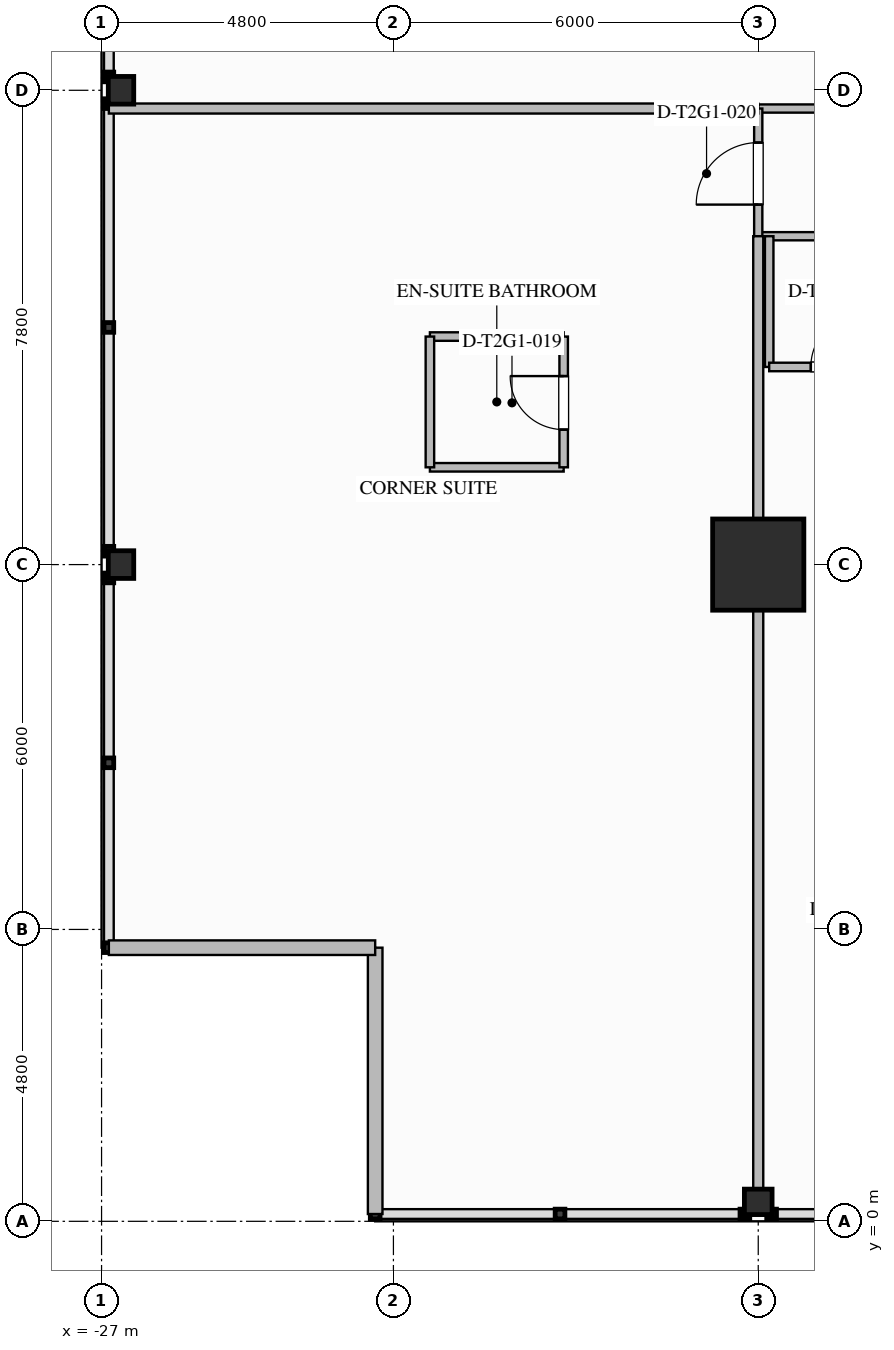
"""IFC4 building model, lengths in metres.
Left out: names, types, materials, properties, quantities, classifications, styles, units other than length and angle.
Written with IfcOpenShell. Run it as: python <this file> out.ifc"""

import sys

from ifc_helpers import new_model, si_unit, direction, frame, frame_2d, origin, origin_2d, place, context, subcontext, project, spatial, rectangle, i_section, extrude, element, fill, save


model = new_model("IFC4")
c1 = context("Model", 3, precision=1e-05, world=origin(), true_north=direction((0.0, 1.0)))
c2 = subcontext(c1, "Body", "Model", "MODEL_VIEW")
j1 = project(units=[si_unit("LENGTHUNIT", "METRE"), si_unit("PLANEANGLEUNIT", "RADIAN")], contexts=[c1])
p1 = place(None, origin())
s1 = spatial("IfcSite", under=j1, at=p1, CompositionType="ELEMENT")
p2 = place(p1, origin())
s2 = spatial("IfcBuilding", under=s1, at=p2, CompositionType="ELEMENT")
p3 = place(p2, frame((0.0, 0.0, 91.8)))
s3 = spatial("IfcBuildingStorey", under=s2, at=p3, CompositionType="ELEMENT", Elevation=91.8)
p4 = place(p3, frame((-16.2, 10.8, 0.0), z_axis=(0.0, 0.0, 1.0), x_axis=(1.0, 0.0, 0.0)))
e1 = element("IfcColumn", 1, at=p4, inside=s3, PredefinedType="COLUMN", context=c2, shape_type="SweptSolid", body=[
    extrude(rectangle(XDim=1.5, YDim=1.5, at=origin_2d()), origin(), (0.0, 0.0, 1.0), 3.5),
])
for number, where, z_axis, x_axis in (
    (2, (-26.68, 10.8, 0.0), (0.0, 0.0, 1.0), (1.0, 0.0, 0.0)),
    (3, (-26.68, 18.6, 0.0), (0.0, 0.0, 1.0), (1.0, 0.0, 0.0)),
    (4, (-16.2, 0.32, 0.0), (0.0, 0.0, 1.0), (0.0, 1.0, 0.0)),
):
    element("IfcColumn", number, at=place(p3, frame(where, z_axis=z_axis, x_axis=x_axis)), inside=s3, PredefinedType="COLUMN", context=c2, shape_type="SweptSolid", body=[
        extrude(i_section(OverallWidth=0.418, OverallDepth=0.455, WebThickness=0.042, FlangeThickness=0.068, FilletRadius=0.03, at=origin_2d()), origin(), (0.0, 0.0, 1.0), 3.497),
    ])
for number, where, z_axis, x_axis in (
    (5, (-22.5, 0.12, 0.0), (0.0, 0.0, 1.0), (0.0, 1.0, 0.0)),
    (6, (-22.5, 4.5, 0.0), (0.0, 0.0, 1.0), (-1.0, 0.0, 0.0)),
):
    element("IfcWall", number, at=place(p3, frame(where, z_axis=z_axis, x_axis=x_axis)), inside=s3, PredefinedType="STANDARD", context=c2, shape_type="SweptSolid", body=[
        extrude(rectangle(XDim=4.38, YDim=0.24, at=frame_2d((2.19, 0.0))), origin(), (0.0, 0.0, 1.0), 3.24),
    ])
p5 = place(p3, frame((-16.2, 18.3, 0.0), z_axis=(0.0, 0.0, 1.0), x_axis=(1.0, 0.0, 0.0)))
e7 = element("IfcWall", 7, at=p5, inside=s3, PredefinedType="PARTITIONING", context=c2, shape_type="SweptSolid", body=[
    extrude(rectangle(XDim=5.4, YDim=0.135, at=frame_2d((2.7, 0.0))), origin(), (0.0, 0.0, 1.0), 3.24),
])
p6 = place(p3, frame((-16.2, 16.2, 0.0), z_axis=(0.0, 0.0, 1.0), x_axis=(1.0, 0.0, 0.0)))
e8 = element("IfcWall", 8, at=p6, inside=s3, PredefinedType="PARTITIONING", context=c2, shape_type="SweptSolid", body=[
    extrude(rectangle(XDim=24.9, YDim=0.135, at=frame_2d((12.45, 0.0))), origin(), (0.0, 0.0, 1.0), 3.24),
])
p7 = place(p6, frame((3.271, 0.0, 0.0)))
e9 = element("IfcOpeningElement", 9, at=p7, cuts=e8, PredefinedType="OPENING", context=c2, shape_type="SweptSolid", body=[
    extrude(rectangle(XDim=0.96, YDim=2.15, at=frame_2d((0.48, 1.075))), frame((0.0, 0.077, 0.0), z_axis=(0.0, -1.0, 0.0), x_axis=(1.0, 0.0, 0.0)), (0.0, 0.0, 1.0), 0.155),
])
p8 = place(p6, frame((8.113, 0.0, 0.0)))
e10 = element("IfcOpeningElement", 10, at=p8, cuts=e8, PredefinedType="OPENING", context=c2, shape_type="SweptSolid", body=[
    extrude(rectangle(XDim=0.96, YDim=2.15, at=frame_2d((0.48, 1.075))), frame((0.0, 0.077, 0.0), z_axis=(0.0, -1.0, 0.0), x_axis=(1.0, 0.0, 0.0)), (0.0, 0.0, 1.0), 0.155),
])
p9 = place(p6, frame((13.035, 0.0, 0.0)))
e11 = element("IfcOpeningElement", 11, at=p9, cuts=e8, PredefinedType="OPENING", context=c2, shape_type="SweptSolid", body=[
    extrude(rectangle(XDim=1.26, YDim=2.2, at=frame_2d((0.63, 1.1))), frame((0.0, 0.077, 0.0), z_axis=(0.0, -1.0, 0.0), x_axis=(1.0, 0.0, 0.0)), (0.0, 0.0, 1.0), 0.155),
])
p10 = place(p6, frame((18.488, 0.0, 0.0)))
e12 = element("IfcOpeningElement", 12, at=p10, cuts=e8, PredefinedType="OPENING", context=c2, shape_type="SweptSolid", body=[
    extrude(rectangle(XDim=0.96, YDim=2.15, at=frame_2d((0.48, 1.075))), frame((0.0, 0.077, 0.0), z_axis=(0.0, -1.0, 0.0), x_axis=(1.0, 0.0, 0.0)), (0.0, 0.0, 1.0), 0.155),
])
p11 = place(p6, frame((23.329, 0.0, 0.0)))
e13 = element("IfcOpeningElement", 13, at=p11, cuts=e8, PredefinedType="OPENING", context=c2, shape_type="SweptSolid", body=[
    extrude(rectangle(XDim=0.96, YDim=2.15, at=frame_2d((0.48, 1.075))), frame((0.0, 0.077, 0.0), z_axis=(0.0, -1.0, 0.0), x_axis=(1.0, 0.0, 0.0)), (0.0, 0.0, 1.0), 0.155),
])
p12 = place(p3, frame((-16.2, 16.2, 0.0), z_axis=(0.0, 0.0, 1.0), x_axis=(0.0, 1.0, 0.0)))
e14 = element("IfcWall", 14, at=p12, inside=s3, PredefinedType="PARTITIONING", context=c2, shape_type="SweptSolid", body=[
    extrude(rectangle(XDim=2.1, YDim=0.135, at=frame_2d((1.05, 0.0))), origin(), (0.0, 0.0, 1.0), 2.452),
])
p13 = place(p12, frame((0.52, 0.0, 0.0)))
e15 = element("IfcOpeningElement", 15, at=p13, cuts=e14, PredefinedType="OPENING", context=c2, shape_type="SweptSolid", body=[
    extrude(rectangle(XDim=1.02, YDim=2.15, at=frame_2d((0.51, 1.075))), frame((0.0, 0.077, 0.0), z_axis=(0.0, -1.0, 0.0), x_axis=(1.0, 0.0, 0.0)), (0.0, 0.0, 1.0), 0.155),
])
p14 = place(p3, frame((-16.2, 0.12, 0.0), z_axis=(0.0, 0.0, 1.0), x_axis=(0.0, 1.0, 0.0)))
e16 = element("IfcWall", 16, at=p14, inside=s3, PredefinedType="PARTITIONING", context=c2, shape_type="SweptSolid", body=[
    extrude(rectangle(XDim=16.08, YDim=0.165, at=frame_2d((8.04, 0.0))), origin(), (0.0, 0.0, 1.0), 2.452),
])
p15 = place(p3, frame((-26.88, 18.3, 0.0), z_axis=(0.0, 0.0, 1.0), x_axis=(1.0, 0.0, 0.0)))
e17 = element("IfcWall", 17, at=p15, inside=s3, PredefinedType="PARTITIONING", context=c2, shape_type="SweptSolid", body=[
    extrude(rectangle(XDim=10.68, YDim=0.165, at=frame_2d((5.34, 0.0))), origin(), (0.0, 0.0, 1.0), 2.452),
])
for number, where, z_axis, x_axis in (
    (18, (-21.6, 12.4, 0.0), (0.0, 0.0, 1.0), (1.0, 0.0, 0.0)),
    (19, (-21.6, 14.55, 0.0), (0.0, 0.0, 1.0), (1.0, 0.0, 0.0)),
):
    element("IfcWall", number, at=place(p3, frame(where, z_axis=z_axis, x_axis=x_axis)), inside=s3, PredefinedType="PLUMBINGWALL", context=c2, shape_type="SweptSolid", body=[
        extrude(rectangle(XDim=2.2, YDim=0.14, at=frame_2d((1.1, 0.0))), origin(), (0.0, 0.0, 1.0), 3.24),
    ])
p16 = place(p3, frame((-21.6, 12.4, 0.0), z_axis=(0.0, 0.0, 1.0), x_axis=(0.0, 1.0, 0.0)))
e20 = element("IfcWall", 20, at=p16, inside=s3, PredefinedType="PLUMBINGWALL", context=c2, shape_type="SweptSolid", body=[
    extrude(rectangle(XDim=2.15, YDim=0.14, at=frame_2d((1.075, 0.0))), origin(), (0.0, 0.0, 1.0), 3.24),
])
p17 = place(p3, frame((-19.4, 12.4, 0.0), z_axis=(0.0, 0.0, 1.0), x_axis=(0.0, 1.0, 0.0)))
e21 = element("IfcWall", 21, at=p17, inside=s3, PredefinedType="PLUMBINGWALL", context=c2, shape_type="SweptSolid", body=[
    extrude(rectangle(XDim=2.15, YDim=0.14, at=frame_2d((1.075, 0.0))), origin(), (0.0, 0.0, 1.0), 3.24),
])
p18 = place(p17, frame((0.62, 0.0, 0.0)))
e22 = element("IfcOpeningElement", 22, at=p18, cuts=e21, PredefinedType="OPENING", context=c2, shape_type="SweptSolid", body=[
    extrude(rectangle(XDim=0.88, YDim=2.1, at=frame_2d((0.44, 1.05))), frame((0.0, 0.08, 0.0), z_axis=(0.0, -1.0, 0.0), x_axis=(1.0, 0.0, 0.0)), (0.0, 0.0, 1.0), 0.16),
])
p19 = place(p3, frame((-16.02, 16.2, 0.0), z_axis=(0.0, 0.0, 1.0), x_axis=(0.0, -1.0, 0.0)))
e23 = element("IfcWall", 23, at=p19, inside=s3, PredefinedType="PLUMBINGWALL", context=c2, shape_type="SweptSolid", body=[
    extrude(rectangle(XDim=2.15, YDim=0.14, at=frame_2d((1.075, 0.0))), origin(), (0.0, 0.0, 1.0), 2.452),
])
p20 = place(p3, frame((-16.02, 14.05, 0.0), z_axis=(0.0, 0.0, 1.0), x_axis=(1.0, 0.0, 0.0)))
e24 = element("IfcWall", 24, at=p20, inside=s3, PredefinedType="PLUMBINGWALL", context=c2, shape_type="SweptSolid", body=[
    extrude(rectangle(XDim=2.25, YDim=0.14, at=frame_2d((1.125, 0.0))), origin(), (0.0, 0.0, 1.0), 3.24),
])
p21 = place(p20, frame((0.685, 0.0, 0.0)))
e25 = element("IfcOpeningElement", 25, at=p21, cuts=e24, PredefinedType="OPENING", context=c2, shape_type="SweptSolid", body=[
    extrude(rectangle(XDim=0.88, YDim=2.1, at=frame_2d((0.44, 1.05))), frame((0.0, 0.08, 0.0), z_axis=(0.0, -1.0, 0.0), x_axis=(1.0, 0.0, 0.0)), (0.0, 0.0, 1.0), 0.16),
])
p22 = place(p18, origin())
e26 = element("IfcDoor", 26, at=p22, inside=s3, OperationType="SINGLE_SWING_RIGHT", PredefinedType="DOOR", context=c2, shape_type="SweptSolid", body=[
    extrude(rectangle(XDim=0.88, YDim=2.1, at=frame_2d((0.44, 1.05))), frame((0.0, 0.025, 0.0), z_axis=(0.0, -1.0, 0.0), x_axis=(1.0, 0.0, 0.0)), (0.0, 0.0, 1.0), 0.05),
])
fill(e22, e26)
p23 = place(p13, origin())
e27 = element("IfcDoor", 27, at=p23, inside=s3, OperationType="SINGLE_SWING_LEFT", PredefinedType="DOOR", context=c2, shape_type="SweptSolid", body=[
    extrude(rectangle(XDim=1.02, YDim=2.15, at=frame_2d((0.51, 1.075))), frame((0.0, 0.025, 0.0), z_axis=(0.0, -1.0, 0.0), x_axis=(1.0, 0.0, 0.0)), (0.0, 0.0, 1.0), 0.05),
])
fill(e15, e27)
p24 = place(p21, origin())
e28 = element("IfcDoor", 28, at=p24, inside=s3, OperationType="SINGLE_SWING_RIGHT", PredefinedType="DOOR", context=c2, shape_type="SweptSolid", body=[
    extrude(rectangle(XDim=0.88, YDim=2.1, at=frame_2d((0.44, 1.05))), frame((0.0, 0.025, 0.0), z_axis=(0.0, -1.0, 0.0), x_axis=(1.0, 0.0, 0.0)), (0.0, 0.0, 1.0), 0.05),
])
fill(e25, e28)
save(model, sys.argv[1])
